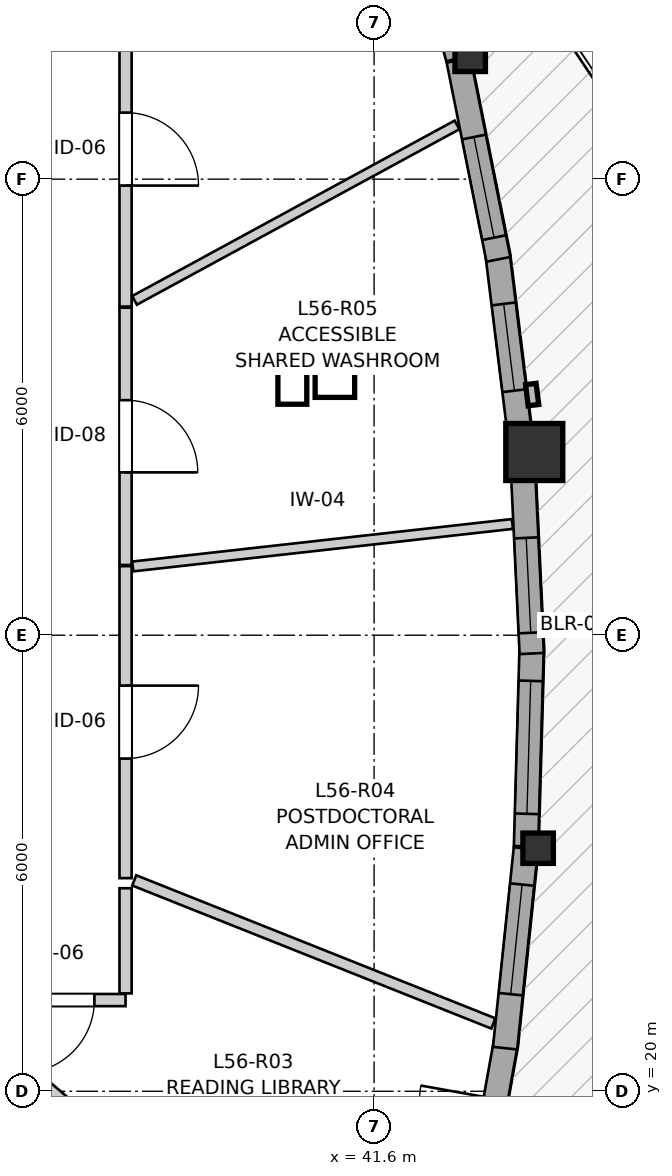
"""IFC4 building model, lengths in metres.
Left out: names, types, materials, properties, quantities, classifications, styles, units other than length and angle.
Written with IfcOpenShell. Run it as: python <this file> out.ifc"""

import sys

from ifc_helpers import new_model, si_unit, direction, frame, frame_2d, origin, origin_2d, place, context, subcontext, project, spatial, rectangle, i_section, extrude, source, transform, mapped, element, fill, save


model = new_model("IFC4")
c1 = context("Model", 3, precision=1e-05, world=origin(), true_north=direction((0.0, 1.0)))
c2 = subcontext(c1, "Body", "Model", "MODEL_VIEW")
j1 = project(units=[si_unit("LENGTHUNIT", "METRE"), si_unit("PLANEANGLEUNIT", "RADIAN")], contexts=[c1])
p1 = place(None, origin())
s1 = spatial("IfcSite", under=j1, at=p1, CompositionType="ELEMENT")
p2 = place(p1, origin())
s2 = spatial("IfcBuilding", under=s1, at=p2, CompositionType="ELEMENT")
p3 = place(p2, frame((0.0, 0.0, 187.4)))
s3 = spatial("IfcBuildingStorey", under=s2, at=p3, CompositionType="ELEMENT", Elevation=187.4)
m1 = source(origin(), c2, "Body", "SweptSolid", [
    extrude(i_section(OverallWidth=0.401, OverallDepth=0.399, WebThickness=0.023, FlangeThickness=0.036, FilletRadius=0.015, at=origin_2d()), origin(), (0.0, 0.0, 1.0), 2.9),
])
p4 = place(p3, frame((43.758, 23.198, 0.0), z_axis=(0.0, 0.0, 1.0), x_axis=(1.0, 0.0, 0.0)))
e1 = element("IfcColumn", 1, at=p4, inside=s3, PredefinedType="PILASTER", context=c2, shape_type="MappedRepresentation", body=[
    mapped(m1, transform((0.0, 0.0, 0.0), x_axis=(1.0, 0.0, 0.0), y_axis=(0.0, 1.0, 0.0), z_axis=(0.0, 0.0, 1.0), scale=1.0)),
])
m2 = source(origin(), c2, "Body", "SweptSolid", [
    extrude(rectangle(XDim=0.75, YDim=0.75, at=origin_2d()), origin(), (0.0, 0.0, 1.0), 2.9),
])
p5 = place(p3, frame((43.708, 28.41, 0.0), z_axis=(0.0, 0.0, 1.0), x_axis=(1.0, 0.0, 0.0)))
e2 = element("IfcColumn", 2, at=p5, inside=s3, PredefinedType="COLUMN", context=c2, shape_type="MappedRepresentation", body=[
    mapped(m2, transform((0.0, 0.0, 0.0), x_axis=(1.0, 0.0, 0.0), y_axis=(0.0, 1.0, 0.0), z_axis=(0.0, 0.0, 1.0), scale=1.0)),
])
p6 = place(p3, frame((42.865, 33.615, 0.0), z_axis=(0.0, 0.0, 1.0), x_axis=(1.0, 0.0, 0.0)))
e3 = element("IfcColumn", 3, at=p6, inside=s3, PredefinedType="PILASTER", context=c2, shape_type="MappedRepresentation", body=[
    mapped(m1, transform((0.0, 0.0, 0.0), x_axis=(1.0, 0.0, 0.0), y_axis=(0.0, 1.0, 0.0), z_axis=(0.0, 0.0, 1.0), scale=1.0)),
])
p7 = place(p3, frame((42.888, 18.168, 0.0), z_axis=(0.0, 0.0, 1.0), x_axis=(0.177158615295, 0.984182312901, 0.0)))
e4 = element("IfcWall", 4, at=p7, inside=s3, PredefinedType="SOLIDWALL", context=c2, shape_type="SweptSolid", body=[
    extrude(rectangle(XDim=2.526, YDim=0.32, at=frame_2d((1.263, 0.0))), origin(), (0.0, 0.0, 1.0), 2.48),
])
p8 = place(p7, frame((0.758, 0.0, 0.0)))
e5 = element("IfcOpeningElement", 5, at=p8, cuts=e4, PredefinedType="OPENING", context=c2, shape_type="SweptSolid", body=[
    extrude(rectangle(XDim=1.0, YDim=2.1, at=frame_2d((0.5, 1.05))), frame((0.0, 0.17, 0.0), z_axis=(0.0, -1.0, 0.0), x_axis=(1.0, 0.0, 0.0)), (0.0, 0.0, 1.0), 0.34),
])
p9 = place(p3, frame((43.323, 20.567, 0.0), z_axis=(0.0, 0.0, 1.0), x_axis=(0.10362132496, 0.9946168212, 0.0)))
e6 = element("IfcWall", 6, at=p9, inside=s3, PredefinedType="SOLIDWALL", context=c2, shape_type="SweptSolid", body=[
    extrude(rectangle(XDim=2.641, YDim=0.32, at=frame_2d((1.321, 0.0))), origin(), (0.0, 0.0, 1.0), 2.48),
])
p10 = place(p9, frame((0.714, 0.0, 0.82)))
e7 = element("IfcOpeningElement", 7, at=p10, cuts=e6, PredefinedType="OPENING", context=c2, shape_type="SweptSolid", body=[
    extrude(rectangle(XDim=1.45, YDim=1.25, at=frame_2d((0.725, 0.625))), frame((0.0, 0.17, 0.0), z_axis=(0.0, -1.0, 0.0), x_axis=(1.0, 0.0, 0.0)), (0.0, 0.0, 1.0), 0.34),
])
p11 = place(p3, frame((43.599, 23.222, 0.0), z_axis=(0.0, 0.0, 1.0), x_axis=(0.028259888897, 0.999600609583, 0.0)))
e8 = element("IfcWall", 8, at=p11, inside=s3, PredefinedType="SOLIDWALL", context=c2, shape_type="SweptSolid", body=[
    extrude(rectangle(XDim=2.626, YDim=0.32, at=frame_2d((1.313, 0.0))), origin(), (0.0, 0.0, 1.0), 2.48),
])
p12 = place(p11, frame((0.428, 0.0, 0.82)))
e9 = element("IfcOpeningElement", 9, at=p12, cuts=e8, PredefinedType="OPENING", context=c2, shape_type="SweptSolid", body=[
    extrude(rectangle(XDim=1.75, YDim=1.3, at=frame_2d((0.875, 0.65))), frame((0.0, 0.17, 0.0), z_axis=(0.0, -1.0, 0.0), x_axis=(1.0, 0.0, 0.0)), (0.0, 0.0, 1.0), 0.34),
])
p13 = place(p3, frame((43.674, 25.76, 0.0), z_axis=(0.0, 0.0, 1.0), x_axis=(-0.047621245569, 0.9988654649, 0.0)))
e10 = element("IfcWall", 10, at=p13, inside=s3, PredefinedType="SOLIDWALL", context=c2, shape_type="SweptSolid", body=[
    extrude(rectangle(XDim=2.481, YDim=0.32, at=frame_2d((1.241, 0.0))), origin(), (0.0, 0.0, 1.0), 2.48),
])
p14 = place(p13, frame((0.273, 0.0, 0.82)))
e11 = element("IfcOpeningElement", 11, at=p14, cuts=e10, PredefinedType="OPENING", context=c2, shape_type="SweptSolid", body=[
    extrude(rectangle(XDim=1.25, YDim=1.35, at=frame_2d((0.625, 0.675))), frame((0.0, 0.17, 0.0), z_axis=(0.0, -1.0, 0.0), x_axis=(1.0, 0.0, 0.0)), (0.0, 0.0, 1.0), 0.34),
])
p15 = place(p3, frame((43.528, 28.554, 0.0), z_axis=(0.0, 0.0, 1.0), x_axis=(-0.122939257513, 0.99241419728, 0.0)))
e12 = element("IfcWall", 12, at=p15, inside=s3, PredefinedType="SOLIDWALL", context=c2, shape_type="SweptSolid", body=[
    extrude(rectangle(XDim=2.496, YDim=0.32, at=frame_2d((1.248, 0.0))), origin(), (0.0, 0.0, 1.0), 2.48),
])
p16 = place(p15, frame((0.668, 0.0, 0.82)))
e13 = element("IfcOpeningElement", 13, at=p16, cuts=e12, PredefinedType="OPENING", context=c2, shape_type="SweptSolid", body=[
    extrude(rectangle(XDim=1.15, YDim=1.2, at=frame_2d((0.575, 0.6))), frame((0.0, 0.17, 0.0), z_axis=(0.0, -1.0, 0.0), x_axis=(1.0, 0.0, 0.0)), (0.0, 0.0, 1.0), 0.34),
])
p17 = place(p3, frame((43.236, 30.945, 0.0), z_axis=(0.0, 0.0, 1.0), x_axis=(-0.196221587905, 0.98055957924, 0.0)))
e14 = element("IfcWall", 14, at=p17, inside=s3, PredefinedType="SOLIDWALL", context=c2, shape_type="SweptSolid", body=[
    extrude(rectangle(XDim=2.671, YDim=0.32, at=frame_2d((1.336, 0.0))), origin(), (0.0, 0.0, 1.0), 2.48),
])
p18 = place(p17, frame((0.291, 0.0, 0.82)))
e15 = element("IfcOpeningElement", 15, at=p18, cuts=e14, PredefinedType="OPENING", context=c2, shape_type="SweptSolid", body=[
    extrude(rectangle(XDim=1.35, YDim=1.45, at=frame_2d((0.675, 0.725))), frame((0.0, 0.17, 0.0), z_axis=(0.0, -1.0, 0.0), x_axis=(1.0, 0.0, 0.0)), (0.0, 0.0, 1.0), 0.34),
])
p19 = place(p3, frame((42.705, 33.592, 0.0), z_axis=(0.0, 0.0, 1.0), x_axis=(-0.266433209731, 0.963853383432, 0.0)))
e16 = element("IfcWall", 16, at=p19, inside=s3, PredefinedType="SOLIDWALL", context=c2, shape_type="SweptSolid", body=[
    extrude(rectangle(XDim=2.715, YDim=0.32, at=frame_2d((1.357, 0.0))), origin(), (0.0, 0.0, 1.0), 2.48),
])
p20 = place(p19, frame((0.522, 0.0, 0.82)))
e17 = element("IfcOpeningElement", 17, at=p20, cuts=e16, PredefinedType="OPENING", context=c2, shape_type="SweptSolid", body=[
    extrude(rectangle(XDim=1.65, YDim=1.45, at=frame_2d((0.825, 0.725))), frame((0.0, 0.17, 0.0), z_axis=(0.0, -1.0, 0.0), x_axis=(1.0, 0.0, 0.0)), (0.0, 0.0, 1.0), 0.34),
])
p21 = place(p3, frame((38.33, 34.45, 0.0), z_axis=(0.0, 0.0, 1.0), x_axis=(0.0, -1.0, 0.0)))
e18 = element("IfcWall", 18, at=p21, inside=s3, PredefinedType="PARTITIONING", context=c2, shape_type="SweptSolid", body=[
    extrude(rectangle(XDim=4.126, YDim=0.16, at=frame_2d((2.063, 0.0))), origin(), (0.0, 0.0, 1.0), 2.538),
])
p22 = place(p21, frame((1.574, 0.0, 0.0)))
e19 = element("IfcOpeningElement", 19, at=p22, cuts=e18, PredefinedType="OPENING", context=c2, shape_type="SweptSolid", body=[
    extrude(rectangle(XDim=0.96, YDim=2.1, at=frame_2d((0.48, 1.05))), frame((0.0, 0.09, 0.0), z_axis=(0.0, -1.0, 0.0), x_axis=(1.0, 0.0, 0.0)), (0.0, 0.0, 1.0), 0.18),
])
p23 = place(p3, frame((38.33, 26.909, 0.0), z_axis=(0.0, 0.0, 1.0), x_axis=(0.0, -1.0, 0.0)))
e20 = element("IfcWall", 20, at=p23, inside=s3, PredefinedType="PARTITIONING", context=c2, shape_type="SweptSolid", body=[
    extrude(rectangle(XDim=4.105, YDim=0.16, at=frame_2d((2.052, 0.0))), origin(), (0.0, 0.0, 1.0), 2.9),
])
p24 = place(p23, frame((1.572, 0.0, 0.0)))
e21 = element("IfcOpeningElement", 21, at=p24, cuts=e20, PredefinedType="OPENING", context=c2, shape_type="SweptSolid", body=[
    extrude(rectangle(XDim=0.96, YDim=2.1, at=frame_2d((0.48, 1.05))), frame((0.0, 0.09, 0.0), z_axis=(0.0, -1.0, 0.0), x_axis=(1.0, 0.0, 0.0)), (0.0, 0.0, 1.0), 0.18),
])
p25 = place(p3, frame((38.33, 30.309, 0.0), z_axis=(0.0, 0.0, 1.0), x_axis=(0.0, -1.0, 0.0)))
e22 = element("IfcWall", 22, at=p25, inside=s3, PredefinedType="PARTITIONING", context=c2, shape_type="SweptSolid", body=[
    extrude(rectangle(XDim=3.385, YDim=0.16, at=frame_2d((1.692, 0.0))), origin(), (0.0, 0.0, 1.0), 2.9),
])
p26 = place(p25, frame((1.217, 0.0, 0.0)))
e23 = element("IfcOpeningElement", 23, at=p26, cuts=e22, PredefinedType="OPENING", context=c2, shape_type="SweptSolid", body=[
    extrude(rectangle(XDim=0.95, YDim=2.1, at=frame_2d((0.475, 1.05))), frame((0.0, 0.09, 0.0), z_axis=(0.0, -1.0, 0.0), x_axis=(1.0, 0.0, 0.0)), (0.0, 0.0, 1.0), 0.18),
])
p27 = place(p3, frame((38.33, 21.2, 0.0), z_axis=(0.0, 0.0, 1.0), x_axis=(-1.0, 0.0, 0.0)))
e24 = element("IfcWall", 24, at=p27, inside=s3, PredefinedType="PARTITIONING", context=c2, shape_type="SweptSolid", body=[
    extrude(rectangle(XDim=1.772, YDim=0.16, at=frame_2d((0.886, 0.0))), origin(), (0.0, 0.0, 1.0), 2.9),
])
p28 = place(p27, frame((0.41, 0.0, 0.0)))
e25 = element("IfcOpeningElement", 25, at=p28, cuts=e24, PredefinedType="OPENING", context=c2, shape_type="SweptSolid", body=[
    extrude(rectangle(XDim=0.96, YDim=2.1, at=frame_2d((0.48, 1.05))), frame((0.0, 0.09, 0.0), z_axis=(0.0, -1.0, 0.0), x_axis=(1.0, 0.0, 0.0)), (0.0, 0.0, 1.0), 0.18),
])
p29 = place(p3, frame((36.603, 20.65, 0.0), z_axis=(0.0, 0.0, 1.0), x_axis=(0.759924803985, -0.650010993975, 0.0)))
e26 = element("IfcWall", 26, at=p29, inside=s3, PredefinedType="PARTITIONING", context=c2, shape_type="SweptSolid", body=[
    extrude(rectangle(XDim=7.294, YDim=0.145, at=frame_2d((3.647, 0.0))), origin(), (0.0, 0.0, 1.0), 2.9),
])
p30 = place(p3, frame((38.444, 22.774, 0.0), z_axis=(0.0, 0.0, 1.0), x_axis=(0.928995588187, -0.37009079579, 0.0)))
e27 = element("IfcWall", 27, at=p30, inside=s3, PredefinedType="PARTITIONING", context=c2, shape_type="SweptSolid", body=[
    extrude(rectangle(XDim=5.085, YDim=0.145, at=frame_2d((2.543, 0.0))), origin(), (0.0, 0.0, 1.0), 2.9),
])
p31 = place(p3, frame((38.425, 26.905, 0.0), z_axis=(0.0, 0.0, 1.0), x_axis=(0.993793959726, 0.111236530025, 0.0)))
e28 = element("IfcWall", 28, at=p31, inside=s3, PredefinedType="PARTITIONING", context=c2, shape_type="SweptSolid", body=[
    extrude(rectangle(XDim=5.026, YDim=0.13, at=frame_2d((2.513, 0.0))), origin(), (0.0, 0.0, 1.0), 2.9),
])
p32 = place(p3, frame((38.448, 30.405, 0.0), z_axis=(0.0, 0.0, 1.0), x_axis=(0.878447426807, 0.477839008805, 0.0)))
e29 = element("IfcWall", 29, at=p32, inside=s3, PredefinedType="PARTITIONING", context=c2, shape_type="SweptSolid", body=[
    extrude(rectangle(XDim=4.83, YDim=0.13, at=frame_2d((2.415, 0.0))), origin(), (0.0, 0.0, 1.0), 2.9),
])
p33 = place(p3, frame((38.33, 21.288, 0.0), z_axis=(0.0, 0.0, 1.0), x_axis=(0.0, 1.0, 0.0)))
e30 = element("IfcWall", 30, at=p33, inside=s3, PredefinedType="PARTITIONING", context=c2, shape_type="SweptSolid", body=[
    extrude(rectangle(XDim=1.383, YDim=0.16, at=frame_2d((0.691, 0.0))), origin(), (0.0, 0.0, 1.0), 2.9),
])
m3 = source(origin(), c2, "Body", "SweptSolid", [
    extrude(rectangle(XDim=1.45, YDim=1.25, at=frame_2d((0.725, 0.625))), frame((0.0, 0.03, 0.0), z_axis=(0.0, -1.0, 0.0), x_axis=(1.0, 0.0, 0.0)), (0.0, 0.0, 1.0), 0.06),
])
p34 = place(p10, origin())
e31 = element("IfcWindow", 31, at=p34, inside=s3, PartitioningType="SINGLE_PANEL", PredefinedType="WINDOW", context=c2, shape_type="MappedRepresentation", body=[
    mapped(m3, transform((0.0, 0.0, 0.0), x_axis=(1.0, 0.0, 0.0), y_axis=(0.0, 1.0, 0.0), z_axis=(0.0, 0.0, 1.0), scale=1.0)),
])
fill(e7, e31)
m4 = source(origin(), c2, "Body", "SweptSolid", [
    extrude(rectangle(XDim=1.75, YDim=1.3, at=frame_2d((0.875, 0.65))), frame((0.0, 0.03, 0.0), z_axis=(0.0, -1.0, 0.0), x_axis=(1.0, 0.0, 0.0)), (0.0, 0.0, 1.0), 0.06),
])
p35 = place(p12, origin())
e32 = element("IfcWindow", 32, at=p35, inside=s3, PartitioningType="SINGLE_PANEL", PredefinedType="WINDOW", context=c2, shape_type="MappedRepresentation", body=[
    mapped(m4, transform((0.0, 0.0, 0.0), x_axis=(1.0, 0.0, 0.0), y_axis=(0.0, 1.0, 0.0), z_axis=(0.0, 0.0, 1.0), scale=1.0)),
])
fill(e9, e32)
m5 = source(origin(), c2, "Body", "SweptSolid", [
    extrude(rectangle(XDim=1.25, YDim=1.35, at=frame_2d((0.625, 0.675))), frame((0.0, 0.03, 0.0), z_axis=(0.0, -1.0, 0.0), x_axis=(1.0, 0.0, 0.0)), (0.0, 0.0, 1.0), 0.06),
])
p36 = place(p14, origin())
e33 = element("IfcWindow", 33, at=p36, inside=s3, PartitioningType="SINGLE_PANEL", PredefinedType="WINDOW", context=c2, shape_type="MappedRepresentation", body=[
    mapped(m5, transform((0.0, 0.0, 0.0), x_axis=(1.0, 0.0, 0.0), y_axis=(0.0, 1.0, 0.0), z_axis=(0.0, 0.0, 1.0), scale=1.0)),
])
fill(e11, e33)
m6 = source(origin(), c2, "Body", "SweptSolid", [
    extrude(rectangle(XDim=1.15, YDim=1.2, at=frame_2d((0.575, 0.6))), frame((0.0, 0.03, 0.0), z_axis=(0.0, -1.0, 0.0), x_axis=(1.0, 0.0, 0.0)), (0.0, 0.0, 1.0), 0.06),
])
p37 = place(p16, origin())
e34 = element("IfcWindow", 34, at=p37, inside=s3, PartitioningType="SINGLE_PANEL", PredefinedType="WINDOW", context=c2, shape_type="MappedRepresentation", body=[
    mapped(m6, transform((0.0, 0.0, 0.0), x_axis=(1.0, 0.0, 0.0), y_axis=(0.0, 1.0, 0.0), z_axis=(0.0, 0.0, 1.0), scale=1.0)),
])
fill(e13, e34)
m7 = source(origin(), c2, "Body", "SweptSolid", [
    extrude(rectangle(XDim=1.35, YDim=1.45, at=frame_2d((0.675, 0.725))), frame((0.0, 0.03, 0.0), z_axis=(0.0, -1.0, 0.0), x_axis=(1.0, 0.0, 0.0)), (0.0, 0.0, 1.0), 0.06),
])
p38 = place(p18, origin())
e35 = element("IfcWindow", 35, at=p38, inside=s3, PartitioningType="SINGLE_PANEL", PredefinedType="WINDOW", context=c2, shape_type="MappedRepresentation", body=[
    mapped(m7, transform((0.0, 0.0, 0.0), x_axis=(1.0, 0.0, 0.0), y_axis=(0.0, 1.0, 0.0), z_axis=(0.0, 0.0, 1.0), scale=1.0)),
])
fill(e15, e35)
m8 = source(origin(), c2, "Body", "SweptSolid", [
    extrude(rectangle(XDim=0.96, YDim=2.1, at=frame_2d((0.48, 1.05))), frame((0.0, 0.025, 0.0), z_axis=(0.0, -1.0, 0.0), x_axis=(1.0, 0.0, 0.0)), (0.0, 0.0, 1.0), 0.05),
])
p39 = place(p22, origin())
e36 = element("IfcDoor", 36, at=p39, inside=s3, OperationType="SINGLE_SWING_RIGHT", PredefinedType="DOOR", context=c2, shape_type="MappedRepresentation", body=[
    mapped(m8, transform((0.0, 0.0, 0.0), x_axis=(1.0, 0.0, 0.0), y_axis=(0.0, 1.0, 0.0), z_axis=(0.0, 0.0, 1.0), scale=1.0)),
])
fill(e19, e36)
p40 = place(p24, origin())
e37 = element("IfcDoor", 37, at=p40, inside=s3, OperationType="SINGLE_SWING_LEFT", PredefinedType="DOOR", context=c2, shape_type="MappedRepresentation", body=[
    mapped(m8, transform((0.0, 0.0, 0.0), x_axis=(1.0, 0.0, 0.0), y_axis=(0.0, 1.0, 0.0), z_axis=(0.0, 0.0, 1.0), scale=1.0)),
])
fill(e21, e37)
m9 = source(origin(), c2, "Body", "SweptSolid", [
    extrude(rectangle(XDim=0.95, YDim=2.1, at=frame_2d((0.475, 1.05))), frame((0.0, 0.025, 0.0), z_axis=(0.0, -1.0, 0.0), x_axis=(1.0, 0.0, 0.0)), (0.0, 0.0, 1.0), 0.05),
])
p41 = place(p26, origin())
e38 = element("IfcDoor", 38, at=p41, inside=s3, OperationType="SINGLE_SWING_RIGHT", PredefinedType="DOOR", context=c2, shape_type="MappedRepresentation", body=[
    mapped(m9, transform((0.0, 0.0, 0.0), x_axis=(1.0, 0.0, 0.0), y_axis=(0.0, 1.0, 0.0), z_axis=(0.0, 0.0, 1.0), scale=1.0)),
])
fill(e23, e38)
p42 = place(p28, origin())
e39 = element("IfcDoor", 39, at=p42, inside=s3, OperationType="SINGLE_SWING_RIGHT", PredefinedType="DOOR", context=c2, shape_type="MappedRepresentation", body=[
    mapped(m8, transform((0.0, 0.0, 0.0), x_axis=(1.0, 0.0, 0.0), y_axis=(0.0, 1.0, 0.0), z_axis=(0.0, 0.0, 1.0), scale=1.0)),
])
fill(e25, e39)
save(model, sys.argv[1])
